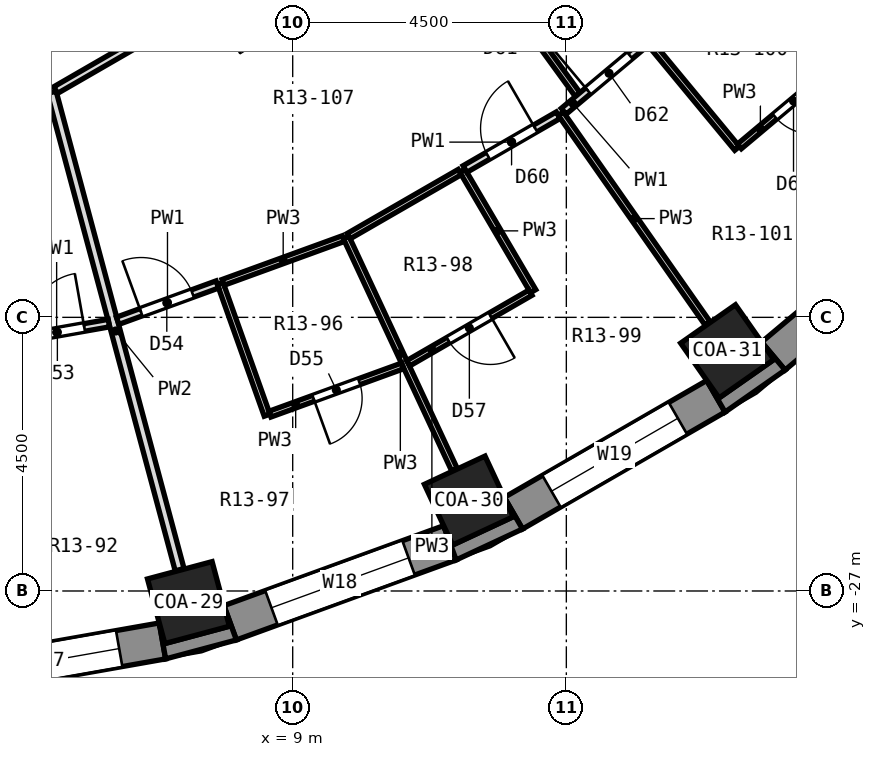
"""IFC4 building model, lengths in metres.
Left out: names, types, materials, properties, quantities, classifications, styles, units other than length and angle.
Written with IfcOpenShell. Run it as: python <this file> out.ifc"""

import sys

from ifc_helpers import new_model, si_unit, direction, frame, frame_2d, origin, origin_2d, place, context, subcontext, project, spatial, polyline, rectangle, outline, extrude, element, fill, save


model = new_model("IFC4")
c1 = context("Model", 3, precision=1e-05, world=origin(), true_north=direction((0.0, 1.0)))
c2 = subcontext(c1, "Body", "Model", "MODEL_VIEW")
j1 = project(units=[si_unit("LENGTHUNIT", "METRE"), si_unit("PLANEANGLEUNIT", "RADIAN")], contexts=[c1])
p1 = place(None, origin())
s1 = spatial("IfcSite", under=j1, at=p1, CompositionType="ELEMENT")
p2 = place(p1, origin())
s2 = spatial("IfcBuilding", under=s1, at=p2, CompositionType="ELEMENT")
p3 = place(p2, frame((0.0, 0.0, 65.9)))
s3 = spatial("IfcBuildingStorey", under=s2, at=p3, CompositionType="ELEMENT", Elevation=65.9)
for number, where, z_axis, x_axis in (
    (1, (7.286, -27.191, 0.0), (0.0, 0.0, 1.0), (0.259, -0.966, 0.0)),
    (2, (11.897, -25.512, 0.0), (0.0, 0.0, 1.0), (0.423, -0.906, 0.0)),
    (3, (16.146, -23.059, 0.0), (0.0, 0.0, 1.0), (0.574, -0.819, 0.0)),
):
    element("IfcColumn", number, at=place(p3, frame(where, z_axis=z_axis, x_axis=x_axis)), inside=s3, PredefinedType="COLUMN", context=c2, shape_type="SweptSolid", body=[
        extrude(rectangle(XDim=1.1, YDim=1.1, at=origin_2d()), origin(), (0.0, 0.0, 1.0), 3.3),
    ])
p4 = place(p3, frame((3.071, -28.489, 0.0), z_axis=(0.0, 0.0, 1.0), x_axis=(0.984800809218, 0.173687553279, 0.0)))
e4 = element("IfcWall", 4, at=p4, inside=s3, PredefinedType="SOLIDWALL", context=c2, shape_type="SweptSolid", body=[
    extrude(rectangle(XDim=3.846, YDim=0.6, at=frame_2d((1.923, 0.0))), origin(), (0.0, 0.0, 1.0), 2.75),
])
p5 = place(p4, frame((0.723, 0.0, 0.9)))
e5 = element("IfcOpeningElement", 5, at=p5, cuts=e4, PredefinedType="OPENING", context=c2, shape_type="SweptSolid", body=[
    extrude(rectangle(XDim=2.4, YDim=1.8, at=frame_2d((1.2, 0.9))), frame((0.0, 0.312, 0.0), z_axis=(0.0, -1.0, 0.0), x_axis=(1.0, 0.0, 0.0)), (0.0, 0.0, 1.0), 0.624),
])
p6 = place(p3, frame((7.971, -27.523, 0.0), z_axis=(0.0, 0.0, 1.0), x_axis=(0.939689588564, 0.342028474173, 0.0)))
e6 = element("IfcWall", 6, at=p6, inside=s3, PredefinedType="SOLIDWALL", context=c2, shape_type="SweptSolid", body=[
    extrude(rectangle(XDim=3.846, YDim=0.6, at=frame_2d((1.923, 0.0))), origin(), (0.0, 0.0, 1.0), 2.75),
])
p7 = place(p6, frame((0.723, 0.0, 0.9)))
e7 = element("IfcOpeningElement", 7, at=p7, cuts=e6, PredefinedType="OPENING", context=c2, shape_type="SweptSolid", body=[
    extrude(rectangle(XDim=2.4, YDim=1.8, at=frame_2d((1.2, 0.9))), frame((0.0, 0.312, 0.0), z_axis=(0.0, -1.0, 0.0), x_axis=(1.0, 0.0, 0.0)), (0.0, 0.0, 1.0), 0.624),
])
p8 = place(p3, frame((12.63, -25.721, 0.0), z_axis=(0.0, 0.0, 1.0), x_axis=(0.86603124159, 0.499989888488, 0.0)))
e8 = element("IfcWall", 8, at=p8, inside=s3, PredefinedType="SOLIDWALL", context=c2, shape_type="SweptSolid", body=[
    extrude(rectangle(XDim=3.846, YDim=0.6, at=frame_2d((1.923, 0.0))), origin(), (0.0, 0.0, 1.0), 2.75),
])
p9 = place(p8, frame((0.723, 0.0, 0.9)))
e9 = element("IfcOpeningElement", 9, at=p9, cuts=e8, PredefinedType="OPENING", context=c2, shape_type="SweptSolid", body=[
    extrude(rectangle(XDim=2.4, YDim=1.8, at=frame_2d((1.2, 0.9))), frame((0.0, 0.312, 0.0), z_axis=(0.0, -1.0, 0.0), x_axis=(1.0, 0.0, 0.0)), (0.0, 0.0, 1.0), 0.624),
])
p10 = place(p3, frame((16.904, -23.137, 0.0), z_axis=(0.0, 0.0, 1.0), x_axis=(0.766026164483, 0.642809392687, 0.0)))
e10 = element("IfcWall", 10, at=p10, inside=s3, PredefinedType="SOLIDWALL", context=c2, shape_type="SweptSolid", body=[
    extrude(rectangle(XDim=3.846, YDim=0.6, at=frame_2d((1.923, 0.0))), origin(), (0.0, 0.0, 1.0), 2.75),
])
p11 = place(p10, frame((0.723, 0.0, 0.9)))
e11 = element("IfcOpeningElement", 11, at=p11, cuts=e10, PredefinedType="OPENING", context=c2, shape_type="SweptSolid", body=[
    extrude(rectangle(XDim=2.4, YDim=1.8, at=frame_2d((1.2, 0.9))), frame((0.0, 0.312, 0.0), z_axis=(0.0, -1.0, 0.0), x_axis=(1.0, 0.0, 0.0)), (0.0, 0.0, 1.0), 0.624),
])
p12 = place(p3, origin())
e12 = element("IfcWall", 12, at=p12, inside=s3, PredefinedType="SOLIDWALL", context=c2, shape_type="SweptSolid", body=[
    extrude(outline(polyline([(6.91, -28.117), (8.074, -27.805), (7.869, -27.241), (7.959, -27.58), (6.897, -27.865), (6.806, -27.526), (6.91, -28.117)])), origin(), (0.0, 0.0, 1.0), 2.75),
])
p13 = place(p3, origin())
e13 = element("IfcWall", 13, at=p13, inside=s3, PredefinedType="SOLIDWALL", context=c2, shape_type="SweptSolid", body=[
    extrude(outline(polyline([(12.78, -25.981), (12.479, -25.461), (12.628, -25.779), (11.631, -26.243), (11.483, -25.926), (11.688, -26.49), (12.78, -25.981)])), origin(), (0.0, 0.0, 1.0), 2.75),
])
p14 = place(p3, origin())
e14 = element("IfcWall", 14, at=p14, inside=s3, PredefinedType="SOLIDWALL", context=c2, shape_type="SweptSolid", body=[
    extrude(outline(polyline([(16.11, -24.058), (17.097, -23.367), (16.711, -22.907), (16.912, -23.194), (16.011, -23.825), (15.81, -23.538), (16.11, -24.058)])), origin(), (0.0, 0.0, 1.0), 2.75),
])
p15 = place(p3, frame((5.037, -18.8, 0.0), z_axis=(0.0, 0.0, 1.0), x_axis=(0.258808663505, -0.96592860797, 0.0)))
e15 = element("IfcWall", 15, at=p15, inside=s3, PredefinedType="PARTITIONING", context=c2, shape_type="SweptSolid", body=[
    extrude(rectangle(XDim=8.127, YDim=0.15, at=frame_2d((4.063, 0.0))), origin(), (0.0, 0.0, 1.0), 2.75),
])
p16 = place(p3, frame((7.808, -21.942, 0.0), z_axis=(0.0, 0.0, 1.0), x_axis=(0.335206501266, -0.942144681835, 0.0)))
e16 = element("IfcWall", 16, at=p16, inside=s3, PredefinedType="PARTITIONING", context=c2, shape_type="SweptSolid", body=[
    extrude(rectangle(XDim=2.3, YDim=0.1, at=frame_2d((1.15, 0.0))), origin(), (0.0, 0.0, 1.0), 2.75),
])
p17 = place(p3, frame((9.88, -21.188, 0.0), z_axis=(0.0, 0.0, 1.0), x_axis=(0.422631582156, -0.906301575506, 0.0)))
e17 = element("IfcWall", 17, at=p17, inside=s3, PredefinedType="PARTITIONING", context=c2, shape_type="SweptSolid", body=[
    extrude(rectangle(XDim=4.212, YDim=0.1, at=frame_2d((2.106, 0.0))), origin(), (0.0, 0.0, 1.0), 2.75),
])
p18 = place(p3, frame((11.79, -20.086, 0.0), z_axis=(0.0, 0.0, 1.0), x_axis=(0.506212585002, -0.862408730699, 0.0)))
e18 = element("IfcWall", 18, at=p18, inside=s3, PredefinedType="PARTITIONING", context=c2, shape_type="SweptSolid", body=[
    extrude(rectangle(XDim=2.3, YDim=0.1, at=frame_2d((1.15, 0.0))), origin(), (0.0, 0.0, 1.0), 2.75),
])
p19 = place(p3, frame((13.409, -19.151, 0.0), z_axis=(0.0, 0.0, 1.0), x_axis=(0.573446781639, -0.819242814206, 0.0)))
e19 = element("IfcWall", 19, at=p19, inside=s3, PredefinedType="PARTITIONING", context=c2, shape_type="SweptSolid", body=[
    extrude(rectangle(XDim=4.211, YDim=0.1, at=frame_2d((2.106, 0.0))), origin(), (0.0, 0.0, 1.0), 2.75),
])
p20 = place(p3, frame((11.148, -15.344, 0.0), z_axis=(0.0, 0.0, 1.0), x_axis=(0.587899330934, -0.8089340991, 0.0)))
e20 = element("IfcWall", 20, at=p20, inside=s3, PredefinedType="PARTITIONING", context=c2, shape_type="SweptSolid", body=[
    extrude(rectangle(XDim=4.318, YDim=0.1, at=frame_2d((2.159, 0.0))), origin(), (0.0, 0.0, 1.0), 2.75),
])
p21 = place(p20, frame((1.709, 0.0, 0.0)))
e21 = element("IfcOpeningElement", 21, at=p21, cuts=e20, PredefinedType="OPENING", context=c2, shape_type="SweptSolid", body=[
    extrude(rectangle(XDim=0.9, YDim=2.1, at=frame_2d((0.45, 1.05))), frame((0.0, 0.062, 0.0), z_axis=(0.0, -1.0, 0.0), x_axis=(1.0, 0.0, 0.0)), (0.0, 0.0, 1.0), 0.124),
])
p22 = place(p3, frame((14.874, -17.988, 0.0), z_axis=(0.0, 0.0, 1.0), x_axis=(0.637512192465, -0.770440266639, 0.0)))
e22 = element("IfcWall", 22, at=p22, inside=s3, PredefinedType="PARTITIONING", context=c2, shape_type="SweptSolid", body=[
    extrude(rectangle(XDim=2.25, YDim=0.1, at=frame_2d((1.125, 0.0))), origin(), (0.0, 0.0, 1.0), 2.75),
])
p23 = place(p3, frame((16.531, -16.531, 0.0), z_axis=(0.0, 0.0, 1.0), x_axis=(0.707106781187, -0.707106781187, 0.0)))
e23 = element("IfcWall", 23, at=p23, inside=s3, PredefinedType="PARTITIONING", context=c2, shape_type="SweptSolid", body=[
    extrude(rectangle(XDim=4.212, YDim=0.1, at=frame_2d((2.106, 0.0))), origin(), (0.0, 0.0, 1.0), 2.75),
])
p24 = place(p3, frame((4.258, -22.898, 0.0), z_axis=(0.0, 0.0, 1.0), x_axis=(0.984792007097, 0.173737453525, 0.0)))
e24 = element("IfcWall", 24, at=p24, inside=s3, PredefinedType="PARTITIONING", context=c2, shape_type="SweptSolid", body=[
    extrude(rectangle(XDim=1.745, YDim=0.125, at=frame_2d((0.873, 0.0))), origin(), (0.0, 0.0, 1.0), 2.75),
])
p25 = place(p24, frame((0.435, 0.0, 0.0)))
e25 = element("IfcOpeningElement", 25, at=p25, cuts=e24, PredefinedType="OPENING", context=c2, shape_type="SweptSolid", body=[
    extrude(rectangle(XDim=0.9, YDim=2.1, at=frame_2d((0.45, 1.05))), frame((0.0, 0.074, 0.0), z_axis=(0.0, -1.0, 0.0), x_axis=(1.0, 0.0, 0.0)), (0.0, 0.0, 1.0), 0.149),
])
p26 = place(p3, frame((8.626, -24.092, 0.0), z_axis=(0.0, 0.0, 1.0), x_axis=(0.939814902169, 0.341683990936, 0.0)))
e26 = element("IfcWall", 26, at=p26, inside=s3, PredefinedType="PARTITIONING", context=c2, shape_type="SweptSolid", body=[
    extrude(rectangle(XDim=2.323, YDim=0.1, at=frame_2d((1.162, 0.0))), origin(), (0.0, 0.0, 1.0), 2.75),
])
p27 = place(p26, frame((0.761, 0.0, 0.0)))
e27 = element("IfcOpeningElement", 27, at=p27, cuts=e26, PredefinedType="OPENING", context=c2, shape_type="SweptSolid", body=[
    extrude(rectangle(XDim=0.8, YDim=2.1, at=frame_2d((0.4, 1.05))), frame((0.0, 0.062, 0.0), z_axis=(0.0, -1.0, 0.0), x_axis=(1.0, 0.0, 0.0)), (0.0, 0.0, 1.0), 0.124),
])
p28 = place(p3, frame((7.855, -21.925, 0.0), z_axis=(0.0, 0.0, 1.0), x_axis=(0.939725675468, 0.341929312674, 0.0)))
e28 = element("IfcWall", 28, at=p28, inside=s3, PredefinedType="PARTITIONING", context=c2, shape_type="SweptSolid", body=[
    extrude(rectangle(XDim=2.105, YDim=0.1, at=frame_2d((1.052, 0.0))), origin(), (0.0, 0.0, 1.0), 2.75),
])
p29 = place(p3, frame((6.122, -22.556, 0.0), z_axis=(0.0, 0.0, 1.0), x_axis=(0.939605351125, 0.342259819635, 0.0)))
e29 = element("IfcWall", 29, at=p29, inside=s3, PredefinedType="PARTITIONING", context=c2, shape_type="SweptSolid", body=[
    extrude(rectangle(XDim=1.745, YDim=0.125, at=frame_2d((0.873, 0.0))), origin(), (0.0, 0.0, 1.0), 2.75),
])
p30 = place(p29, frame((0.41, 0.0, 0.0)))
e30 = element("IfcOpeningElement", 30, at=p30, cuts=e29, PredefinedType="OPENING", context=c2, shape_type="SweptSolid", body=[
    extrude(rectangle(XDim=0.9, YDim=2.1, at=frame_2d((0.45, 1.05))), frame((0.0, 0.074, 0.0), z_axis=(0.0, -1.0, 0.0), x_axis=(1.0, 0.0, 0.0)), (0.0, 0.0, 1.0), 0.149),
])
p31 = place(p3, frame((10.899, -23.256, 0.0), z_axis=(0.0, 0.0, 1.0), x_axis=(0.865852932048, 0.500298610895, 0.0)))
e31 = element("IfcWall", 31, at=p31, inside=s3, PredefinedType="PARTITIONING", context=c2, shape_type="SweptSolid", body=[
    extrude(rectangle(XDim=2.323, YDim=0.1, at=frame_2d((1.161, 0.0))), origin(), (0.0, 0.0, 1.0), 2.75),
])
p32 = place(p31, frame((0.761, 0.0, 0.0)))
e32 = element("IfcOpeningElement", 32, at=p32, cuts=e31, PredefinedType="OPENING", context=c2, shape_type="SweptSolid", body=[
    extrude(rectangle(XDim=0.8, YDim=2.1, at=frame_2d((0.4, 1.05))), frame((0.0, 0.062, 0.0), z_axis=(0.0, -1.0, 0.0), x_axis=(1.0, 0.0, 0.0)), (0.0, 0.0, 1.0), 0.124),
])
p33 = place(p3, frame((9.923, -21.163, 0.0), z_axis=(0.0, 0.0, 1.0), x_axis=(0.866158552195, 0.499769309241, 0.0)))
e33 = element("IfcWall", 33, at=p33, inside=s3, PredefinedType="PARTITIONING", context=c2, shape_type="SweptSolid", body=[
    extrude(rectangle(XDim=2.105, YDim=0.1, at=frame_2d((1.052, 0.0))), origin(), (0.0, 0.0, 1.0), 2.75),
])
p34 = place(p3, frame((11.833, -20.061, 0.0), z_axis=(0.0, 0.0, 1.0), x_axis=(0.865967311171, 0.500100605862, 0.0)))
e34 = element("IfcWall", 34, at=p34, inside=s3, PredefinedType="PARTITIONING", context=c2, shape_type="SweptSolid", body=[
    extrude(rectangle(XDim=1.77, YDim=0.125, at=frame_2d((0.885, 0.0))), origin(), (0.0, 0.0, 1.0), 2.75),
])
p35 = place(p34, frame((0.435, 0.0, 0.0)))
e35 = element("IfcOpeningElement", 35, at=p35, cuts=e34, PredefinedType="OPENING", context=c2, shape_type="SweptSolid", body=[
    extrude(rectangle(XDim=0.9, YDim=2.1, at=frame_2d((0.45, 1.05))), frame((0.0, 0.074, 0.0), z_axis=(0.0, -1.0, 0.0), x_axis=(1.0, 0.0, 0.0)), (0.0, 0.0, 1.0), 0.149),
])
p36 = place(p3, frame((5.102, -18.762, 0.0), z_axis=(0.0, 0.0, 1.0), x_axis=(0.866071189182, 0.499920688979, 0.0)))
e36 = element("IfcWall", 36, at=p36, inside=s3, PredefinedType="PARTITIONING", context=c2, shape_type="SweptSolid", body=[
    extrude(rectangle(XDim=9.95, YDim=0.125, at=frame_2d((4.975, 0.0))), origin(), (0.0, 0.0, 1.0), 2.75),
])
p37 = place(p36, frame((2.932, 0.0, 0.0)))
e37 = element("IfcOpeningElement", 37, at=p37, cuts=e36, PredefinedType="OPENING", context=c2, shape_type="SweptSolid", body=[
    extrude(rectangle(XDim=1.0, YDim=2.1, at=frame_2d((0.5, 1.05))), frame((0.0, 0.074, 0.0), z_axis=(0.0, -1.0, 0.0), x_axis=(1.0, 0.0, 0.0)), (0.0, 0.0, 1.0), 0.149),
])
p38 = place(p3, frame((13.457, -19.111, 0.0), z_axis=(0.0, 0.0, 1.0), x_axis=(0.766590701723, 0.642136041686, 0.0)))
e38 = element("IfcWall", 38, at=p38, inside=s3, PredefinedType="PARTITIONING", context=c2, shape_type="SweptSolid", body=[
    extrude(rectangle(XDim=1.758, YDim=0.125, at=frame_2d((0.879, 0.0))), origin(), (0.0, 0.0, 1.0), 2.75),
])
p39 = place(p38, frame((0.523, 0.0, 0.0)))
e39 = element("IfcOpeningElement", 39, at=p39, cuts=e38, PredefinedType="OPENING", context=c2, shape_type="SweptSolid", body=[
    extrude(rectangle(XDim=0.9, YDim=2.1, at=frame_2d((0.45, 1.05))), frame((0.0, 0.074, 0.0), z_axis=(0.0, -1.0, 0.0), x_axis=(1.0, 0.0, 0.0)), (0.0, 0.0, 1.0), 0.149),
])
p40 = place(p3, frame((16.346, -19.689, 0.0), z_axis=(0.0, 0.0, 1.0), x_axis=(0.766106399864, 0.642713765286, 0.0)))
e40 = element("IfcWall", 40, at=p40, inside=s3, PredefinedType="PARTITIONING", context=c2, shape_type="SweptSolid", body=[
    extrude(rectangle(XDim=2.323, YDim=0.1, at=frame_2d((1.161, 0.0))), origin(), (0.0, 0.0, 1.0), 2.75),
])
p41 = place(p40, frame((0.761, 0.0, 0.0)))
e41 = element("IfcOpeningElement", 41, at=p41, cuts=e40, PredefinedType="OPENING", context=c2, shape_type="SweptSolid", body=[
    extrude(rectangle(XDim=0.8, YDim=2.1, at=frame_2d((0.4, 1.05))), frame((0.0, 0.062, 0.0), z_axis=(0.0, -1.0, 0.0), x_axis=(1.0, 0.0, 0.0)), (0.0, 0.0, 1.0), 0.124),
])
p42 = place(p5, origin())
e42 = element("IfcWindow", 42, at=p42, inside=s3, PartitioningType="SINGLE_PANEL", PredefinedType="WINDOW", context=c2, shape_type="SweptSolid", body=[
    extrude(rectangle(XDim=2.4, YDim=1.8, at=frame_2d((1.2, 0.9))), frame((0.0, 0.18, 0.0), z_axis=(0.0, -1.0, 0.0), x_axis=(1.0, 0.0, 0.0)), (0.0, 0.0, 1.0), 0.06),
])
fill(e5, e42)
p43 = place(p7, origin())
e43 = element("IfcWindow", 43, at=p43, inside=s3, PartitioningType="SINGLE_PANEL", PredefinedType="WINDOW", context=c2, shape_type="SweptSolid", body=[
    extrude(rectangle(XDim=2.4, YDim=1.8, at=frame_2d((1.2, 0.9))), frame((0.0, 0.18, 0.0), z_axis=(0.0, -1.0, 0.0), x_axis=(1.0, 0.0, 0.0)), (0.0, 0.0, 1.0), 0.06),
])
fill(e7, e43)
p44 = place(p9, origin())
e44 = element("IfcWindow", 44, at=p44, inside=s3, PartitioningType="SINGLE_PANEL", PredefinedType="WINDOW", context=c2, shape_type="SweptSolid", body=[
    extrude(rectangle(XDim=2.4, YDim=1.8, at=frame_2d((1.2, 0.9))), frame((0.0, 0.18, 0.0), z_axis=(0.0, -1.0, 0.0), x_axis=(1.0, 0.0, 0.0)), (0.0, 0.0, 1.0), 0.06),
])
fill(e9, e44)
p45 = place(p25, origin())
e45 = element("IfcDoor", 45, at=p45, inside=s3, OperationType="SINGLE_SWING_RIGHT", PredefinedType="DOOR", context=c2, shape_type="SweptSolid", body=[
    extrude(rectangle(XDim=0.9, YDim=2.1, at=frame_2d((0.45, 1.05))), frame((0.0, 0.025, 0.0), z_axis=(0.0, -1.0, 0.0), x_axis=(1.0, 0.0, 0.0)), (0.0, 0.0, 1.0), 0.05),
])
fill(e25, e45)
p46 = place(p30, origin())
e46 = element("IfcDoor", 46, at=p46, inside=s3, OperationType="SINGLE_SWING_LEFT", PredefinedType="DOOR", context=c2, shape_type="SweptSolid", body=[
    extrude(rectangle(XDim=0.9, YDim=2.1, at=frame_2d((0.45, 1.05))), frame((0.0, 0.025, 0.0), z_axis=(0.0, -1.0, 0.0), x_axis=(1.0, 0.0, 0.0)), (0.0, 0.0, 1.0), 0.05),
])
fill(e30, e46)
p47 = place(p27, frame((0.8, 0.0, 0.0), z_axis=(0.0, 0.0, 1.0), x_axis=(-1.0, 0.0, 0.0)))
e47 = element("IfcDoor", 47, at=p47, inside=s3, OperationType="SINGLE_SWING_RIGHT", PredefinedType="DOOR", context=c2, shape_type="SweptSolid", body=[
    extrude(rectangle(XDim=0.8, YDim=2.1, at=frame_2d((0.4, 1.05))), frame((0.0, 0.025, 0.0), z_axis=(0.0, -1.0, 0.0), x_axis=(1.0, 0.0, 0.0)), (0.0, 0.0, 1.0), 0.05),
])
fill(e27, e47)
p48 = place(p32, frame((0.8, 0.0, 0.0), z_axis=(0.0, 0.0, 1.0), x_axis=(-1.0, 0.0, 0.0)))
e48 = element("IfcDoor", 48, at=p48, inside=s3, OperationType="SINGLE_SWING_LEFT", PredefinedType="DOOR", context=c2, shape_type="SweptSolid", body=[
    extrude(rectangle(XDim=0.8, YDim=2.1, at=frame_2d((0.4, 1.05))), frame((0.0, 0.025, 0.0), z_axis=(0.0, -1.0, 0.0), x_axis=(1.0, 0.0, 0.0)), (0.0, 0.0, 1.0), 0.05),
])
fill(e32, e48)
p49 = place(p35, origin())
e49 = element("IfcDoor", 49, at=p49, inside=s3, OperationType="SINGLE_SWING_RIGHT", PredefinedType="DOOR", context=c2, shape_type="SweptSolid", body=[
    extrude(rectangle(XDim=0.9, YDim=2.1, at=frame_2d((0.45, 1.05))), frame((0.0, 0.025, 0.0), z_axis=(0.0, -1.0, 0.0), x_axis=(1.0, 0.0, 0.0)), (0.0, 0.0, 1.0), 0.05),
])
fill(e35, e49)
p50 = place(p39, origin())
e50 = element("IfcDoor", 50, at=p50, inside=s3, OperationType="SINGLE_SWING_LEFT", PredefinedType="DOOR", context=c2, shape_type="SweptSolid", body=[
    extrude(rectangle(XDim=0.9, YDim=2.1, at=frame_2d((0.45, 1.05))), frame((0.0, 0.025, 0.0), z_axis=(0.0, -1.0, 0.0), x_axis=(1.0, 0.0, 0.0)), (0.0, 0.0, 1.0), 0.05),
])
fill(e39, e50)
p51 = place(p41, frame((0.8, 0.0, 0.0), z_axis=(0.0, 0.0, 1.0), x_axis=(-1.0, 0.0, 0.0)))
e51 = element("IfcDoor", 51, at=p51, inside=s3, OperationType="SINGLE_SWING_LEFT", PredefinedType="DOOR", context=c2, shape_type="SweptSolid", body=[
    extrude(rectangle(XDim=0.8, YDim=2.1, at=frame_2d((0.4, 1.05))), frame((0.0, 0.025, 0.0), z_axis=(0.0, -1.0, 0.0), x_axis=(1.0, 0.0, 0.0)), (0.0, 0.0, 1.0), 0.05),
])
fill(e41, e51)
save(model, sys.argv[1])
